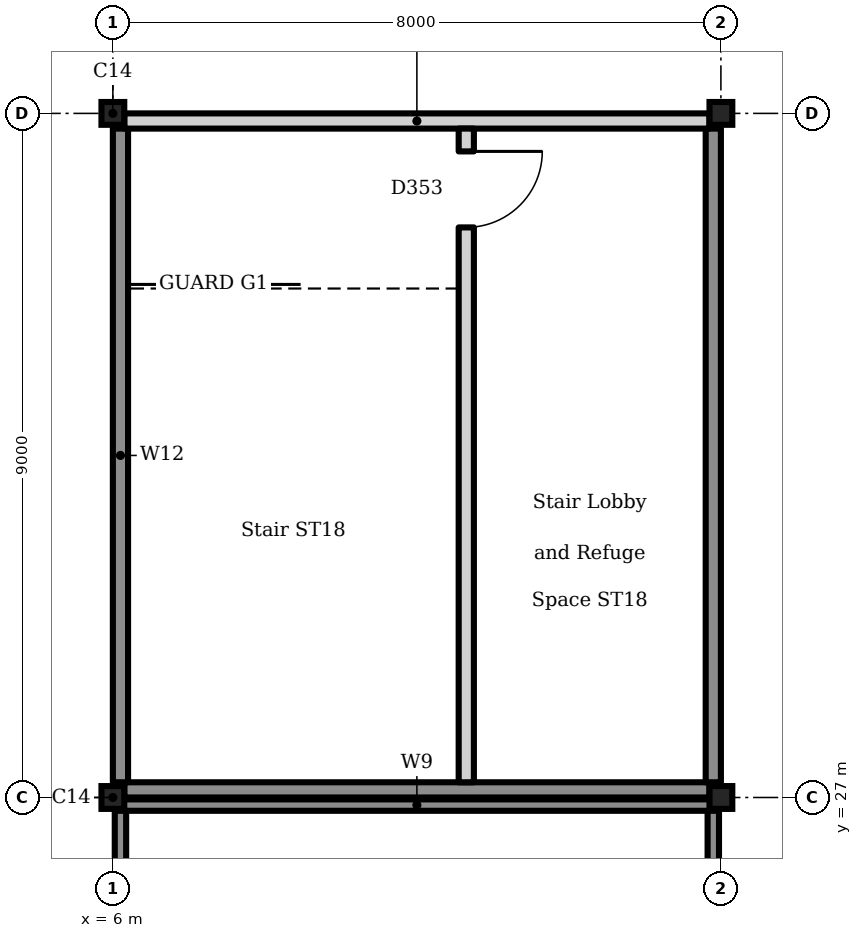
"""IFC4 building model, lengths in metres.
Left out: names, types, materials, properties, quantities, classifications, styles, units other than length and angle.
Written with IfcOpenShell. Run it as: python <this file> out.ifc"""

import sys

from ifc_helpers import new_model, si_unit, direction, frame, frame_2d, origin, origin_2d, place, context, subcontext, project, spatial, rectangle, i_section, extrude, element, fill, save


model = new_model("IFC4")
c1 = context("Model", 3, precision=1e-05, world=origin(), true_north=direction((0.0, 1.0)))
c2 = subcontext(c1, "Body", "Model", "MODEL_VIEW")
j1 = project(units=[si_unit("LENGTHUNIT", "METRE"), si_unit("PLANEANGLEUNIT", "RADIAN")], contexts=[c1])
p1 = place(None, origin())
s1 = spatial("IfcSite", under=j1, at=p1, CompositionType="ELEMENT")
p2 = place(p1, origin())
s2 = spatial("IfcBuilding", under=s1, at=p2, CompositionType="ELEMENT")
p3 = place(p2, frame((0.0, 0.0, 14.4)))
s3 = spatial("IfcBuildingStorey", under=s2, at=p3, CompositionType="ELEMENT", Elevation=14.4)
for number, where, z_axis, x_axis in (
    (1, (6.0, 27.0, 0.0), (0.0, 0.0, 1.0), (1.0, 0.0, 0.0)),
    (2, (6.0, 36.0, 0.0), (0.0, 0.0, 1.0), (1.0, 0.0, 0.0)),
    (3, (14.0, 27.0, 0.0), (0.0, 0.0, 1.0), (1.0, 0.0, 0.0)),
    (4, (14.0, 36.0, 0.0), (0.0, 0.0, 1.0), (1.0, 0.0, 0.0)),
):
    element("IfcColumn", number, at=place(p3, frame(where, z_axis=z_axis, x_axis=x_axis)), inside=s3, PredefinedType="COLUMN", context=c2, shape_type="SweptSolid", body=[
        extrude(i_section(OverallWidth=0.3, OverallDepth=0.3, WebThickness=0.011, FlangeThickness=0.019, FilletRadius=0.027, at=origin_2d()), origin(), (0.0, 0.0, 1.0), 3.6),
    ])
p4 = place(p3, frame((6.1, 26.9, 0.0), z_axis=(0.0, 0.0, 1.0), x_axis=(1.0, 0.0, 0.0)))
e5 = element("IfcWall", 5, at=p4, inside=s3, PredefinedType="SOLIDWALL", context=c2, shape_type="SweptSolid", body=[
    extrude(rectangle(XDim=7.8, YDim=0.15, at=frame_2d((3.9, 0.0))), origin(), (0.0, 0.0, 1.0), 0.15),
])
for number, where, z_axis, x_axis in (
    (6, (6.1, 9.175, 0.0), (0.0, 0.0, 1.0), (0.0, 1.0, 0.0)),
    (7, (13.9, 9.175, 0.0), (0.0, 0.0, 1.0), (0.0, 1.0, 0.0)),
):
    element("IfcWall", number, at=place(p3, frame(where, z_axis=z_axis, x_axis=x_axis)), inside=s3, PredefinedType="SOLIDWALL", context=c2, shape_type="SweptSolid", body=[
        extrude(rectangle(XDim=17.65, YDim=0.15, at=frame_2d((8.825, 0.0))), origin(), (0.0, 0.0, 1.0), 0.15),
    ])
for number, where, z_axis, x_axis in (
    (8, (6.1, 27.1, 3.85), (0.0, 0.0, 1.0), (1.0, 0.0, 0.0)),
    (9, (6.1, 35.9, 3.85), (0.0, 0.0, 1.0), (1.0, 0.0, 0.0)),
):
    element("IfcWall", number, at=place(p3, frame(where, z_axis=z_axis, x_axis=x_axis)), inside=s3, PredefinedType="SOLIDWALL", context=c2, shape_type="SweptSolid", body=[
        extrude(rectangle(XDim=7.8, YDim=0.15, at=frame_2d((3.9, 0.0))), origin(), (0.0, 0.0, 1.0), 0.15),
    ])
for number, where, z_axis, x_axis in (
    (10, (6.1, 27.175, 3.85), (0.0, 0.0, 1.0), (0.0, 1.0, 0.0)),
    (11, (13.9, 27.175, 3.85), (0.0, 0.0, 1.0), (0.0, 1.0, 0.0)),
):
    element("IfcWall", number, at=place(p3, frame(where, z_axis=z_axis, x_axis=x_axis)), inside=s3, PredefinedType="SOLIDWALL", context=c2, shape_type="SweptSolid", body=[
        extrude(rectangle(XDim=8.65, YDim=0.15, at=frame_2d((4.325, 0.0))), origin(), (0.0, 0.0, 1.0), 0.15),
    ])
p5 = place(p3, frame((6.15, 27.1, 0.0), z_axis=(0.0, 0.0, 1.0), x_axis=(1.0, 0.0, 0.0)))
e12 = element("IfcWall", 12, at=p5, inside=s3, PredefinedType="SOLIDWALL", context=c2, shape_type="SweptSolid", body=[
    extrude(rectangle(XDim=7.7, YDim=0.2, at=frame_2d((3.85, 0.0))), origin(), (0.0, 0.0, 1.0), 3.6),
])
p6 = place(p3, frame((6.1, 27.2, 0.0), z_axis=(0.0, 0.0, 1.0), x_axis=(0.0, 1.0, 0.0)))
e13 = element("IfcWall", 13, at=p6, inside=s3, PredefinedType="SOLIDWALL", context=c2, shape_type="SweptSolid", body=[
    extrude(rectangle(XDim=8.6, YDim=0.2, at=frame_2d((4.3, 0.0))), origin(), (0.0, 0.0, 1.0), 3.6),
])
p7 = place(p3, frame((6.15, 35.9, 0.0), z_axis=(0.0, 0.0, 1.0), x_axis=(1.0, 0.0, 0.0)))
e14 = element("IfcWall", 14, at=p7, inside=s3, PredefinedType="SOLIDWALL", context=c2, shape_type="SweptSolid", body=[
    extrude(rectangle(XDim=7.7, YDim=0.2, at=frame_2d((3.85, 0.0))), origin(), (0.0, 0.0, 1.0), 3.6),
])
p8 = place(p3, frame((13.9, 27.2, 0.0), z_axis=(0.0, 0.0, 1.0), x_axis=(0.0, 1.0, 0.0)))
e15 = element("IfcWall", 15, at=p8, inside=s3, PredefinedType="SOLIDWALL", context=c2, shape_type="SweptSolid", body=[
    extrude(rectangle(XDim=8.6, YDim=0.2, at=frame_2d((4.3, 0.0))), origin(), (0.0, 0.0, 1.0), 3.6),
])
p9 = place(p3, frame((10.65, 27.2, 0.0), z_axis=(0.0, 0.0, 1.0), x_axis=(0.0, 1.0, 0.0)))
e16 = element("IfcWall", 16, at=p9, inside=s3, PredefinedType="SOLIDWALL", context=c2, shape_type="SweptSolid", body=[
    extrude(rectangle(XDim=8.6, YDim=0.2, at=frame_2d((4.3, 0.0))), origin(), (0.0, 0.0, 1.0), 3.6),
])
p10 = place(p9, frame((7.3, 0.0, 0.0)))
e17 = element("IfcOpeningElement", 17, at=p10, cuts=e16, PredefinedType="OPENING", context=c2, shape_type="SweptSolid", body=[
    extrude(rectangle(XDim=1.0, YDim=2.1, at=frame_2d((0.5, 1.05))), frame((0.0, 0.11, 0.0), z_axis=(0.0, -1.0, 0.0), x_axis=(1.0, 0.0, 0.0)), (0.0, 0.0, 1.0), 0.22),
])
p11 = place(p10, frame((1.0, 0.0, 0.0), z_axis=(0.0, 0.0, 1.0), x_axis=(-1.0, 0.0, 0.0)))
e18 = element("IfcDoor", 18, at=p11, inside=s3, OperationType="SINGLE_SWING_RIGHT", PredefinedType="DOOR", context=c2, shape_type="SweptSolid", body=[
    extrude(rectangle(XDim=1.0, YDim=2.1, at=frame_2d((0.5, 1.05))), frame((0.0, 0.025, 0.0), z_axis=(0.0, -1.0, 0.0), x_axis=(1.0, 0.0, 0.0)), (0.0, 0.0, 1.0), 0.05),
])
fill(e17, e18)
save(model, sys.argv[1])
